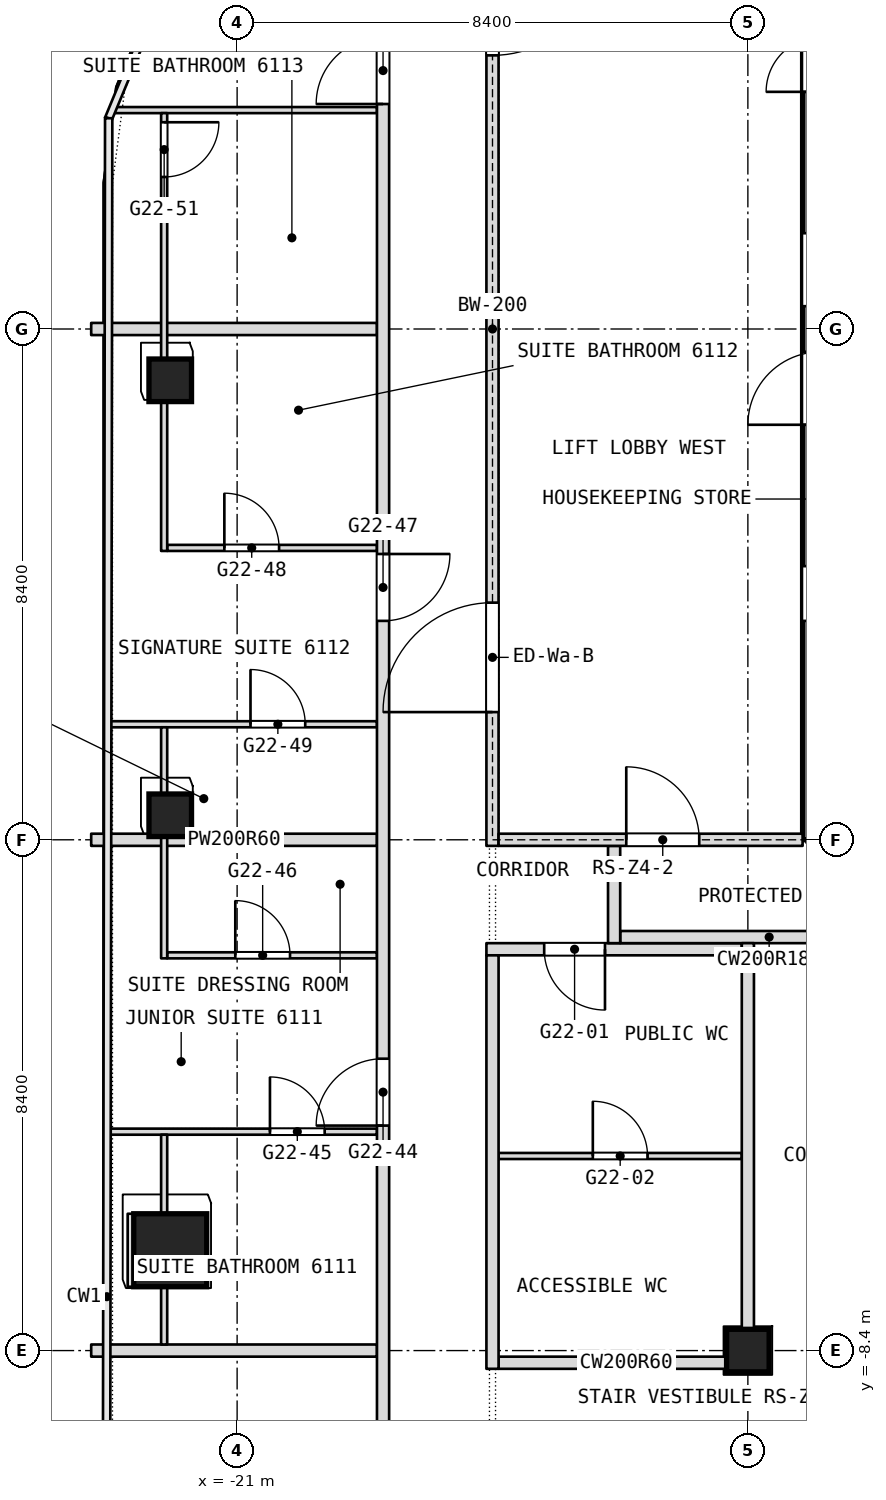
"""IFC4 building model, lengths in metres.
Left out: names, types, materials, properties, quantities, classifications, styles, units other than length and angle.
Written with IfcOpenShell. Run it as: python <this file> out.ifc"""

import sys

from ifc_helpers import new_model, si_unit, direction, frame, frame_2d, origin, origin_2d, place, context, subcontext, project, spatial, rectangle, extrude, element, fill, save


model = new_model("IFC4")
c1 = context("Model", 3, precision=1e-05, world=origin(), true_north=direction((0.0, 1.0)))
c2 = subcontext(c1, "Body", "Model", "MODEL_VIEW")
j1 = project(units=[si_unit("LENGTHUNIT", "METRE"), si_unit("PLANEANGLEUNIT", "RADIAN")], contexts=[c1])
p1 = place(None, origin())
s1 = spatial("IfcSite", under=j1, at=p1, CompositionType="ELEMENT")
p2 = place(p1, origin())
s2 = spatial("IfcBuilding", under=s1, at=p2, CompositionType="ELEMENT")
p3 = place(p2, frame((0.0, 0.0, 266.9)))
s3 = spatial("IfcBuildingStorey", under=s2, at=p3, CompositionType="ELEMENT", Elevation=266.9)
p4 = place(p3, frame((-11.4, 0.0, 0.0), z_axis=(0.0, 0.0, 1.0), x_axis=(0.0, 1.0, 0.0)))
e1 = element("IfcWall", 1, at=p4, inside=s3, PredefinedType="SHEAR", context=c2, shape_type="SweptSolid", body=[
    extrude(rectangle(XDim=16.8, YDim=0.6, at=frame_2d((8.4, 0.0))), origin(), (0.0, 0.0, 1.0), 3.6),
])
p5 = place(p4, frame((3.6, 0.0, 0.0)))
e2 = element("IfcOpeningElement", 2, at=p5, cuts=e1, PredefinedType="OPENING", context=c2, shape_type="SweptSolid", body=[
    extrude(rectangle(XDim=0.9, YDim=2.1, at=frame_2d((0.45, 1.05))), frame((0.0, 0.3, 0.0), z_axis=(0.0, -1.0, 0.0), x_axis=(1.0, 0.0, 0.0)), (0.0, 0.0, 1.0), 0.6),
])
p6 = place(p4, frame((6.825, 0.0, 0.0)))
e3 = element("IfcOpeningElement", 3, at=p6, cuts=e1, PredefinedType="OPENING", context=c2, shape_type="SweptSolid", body=[
    extrude(rectangle(XDim=1.2, YDim=2.1, at=frame_2d((0.6, 1.05))), frame((0.0, 0.3, 0.0), z_axis=(0.0, -1.0, 0.0), x_axis=(1.0, 0.0, 0.0)), (0.0, 0.0, 1.0), 0.6),
])
p7 = place(p4, frame((12.3, 0.0, 0.0)))
e4 = element("IfcOpeningElement", 4, at=p7, cuts=e1, PredefinedType="OPENING", context=c2, shape_type="SweptSolid", body=[
    extrude(rectangle(XDim=0.9, YDim=2.1, at=frame_2d((0.45, 1.05))), frame((0.0, 0.3, 0.0), z_axis=(0.0, -1.0, 0.0), x_axis=(1.0, 0.0, 0.0)), (0.0, 0.0, 1.0), 0.6),
])
p8 = place(p4, frame((8.775, 0.0, 0.0)))
e5 = element("IfcOpeningElement", 5, at=p8, cuts=e1, PredefinedType="OPENING", context=c2, shape_type="SweptSolid", body=[
    extrude(rectangle(XDim=1.2, YDim=2.1, at=frame_2d((0.6, 1.05))), frame((0.0, 0.3, 0.0), z_axis=(0.0, -1.0, 0.0), x_axis=(1.0, 0.0, 0.0)), (0.0, 0.0, 1.0), 0.6),
])
p9 = place(p3, frame((-22.1, -6.75, 0.0), z_axis=(0.0, 0.0, 1.0), x_axis=(1.0, 0.0, 0.0)))
e6 = element("IfcColumn", 6, at=p9, inside=s3, PredefinedType="COLUMN", context=c2, shape_type="SweptSolid", body=[
    extrude(rectangle(XDim=1.2, YDim=1.2, at=origin_2d()), origin(), (0.0, 0.0, 1.0), 3.6),
])
for number, where, z_axis, x_axis in (
    (7, (-12.6, -8.4, 0.0), (0.0, 0.0, 1.0), (1.0, 0.0, 0.0)),
    (8, (-22.1, 0.403, 0.0), (0.0, 0.0, 1.0), (1.0, 0.0, 0.0)),
    (9, (-22.1, 7.556, 0.0), (0.0, 0.0, 1.0), (1.0, 0.0, 0.0)),
):
    element("IfcColumn", number, at=place(p3, frame(where, z_axis=z_axis, x_axis=x_axis)), inside=s3, PredefinedType="COLUMN", context=c2, shape_type="SweptSolid", body=[
        extrude(rectangle(XDim=0.7, YDim=0.7, at=origin_2d()), origin(), (0.0, 0.0, 1.0), 3.6),
    ])
p10 = place(p3, frame((-16.7, -8.6, 0.0), z_axis=(0.0, 0.0, 1.0), x_axis=(1.0, 0.0, 0.0)))
e10 = element("IfcWall", 10, at=p10, inside=s3, PredefinedType="PARTITIONING", context=c2, shape_type="SweptSolid", body=[
    extrude(rectangle(XDim=4.2, YDim=0.2, at=frame_2d((2.1, 0.0))), origin(), (0.0, 0.0, 1.0), 3.34),
])
p11 = place(p3, frame((-23.4, -8.4, 0.0), z_axis=(0.0, 0.0, 1.0), x_axis=(1.0, 0.0, 0.0)))
e11 = element("IfcWall", 11, at=p11, inside=s3, PredefinedType="PARTITIONING", context=c2, shape_type="SweptSolid", body=[
    extrude(rectangle(XDim=4.7, YDim=0.2, at=frame_2d((2.35, 0.0))), origin(), (0.0, 0.0, 1.0), 3.0),
])
p12 = place(p3, frame((-16.7, -5.2, 0.0), z_axis=(0.0, 0.0, 1.0), x_axis=(1.0, 0.0, 0.0)))
e12 = element("IfcWall", 12, at=p12, inside=s3, PredefinedType="PARTITIONING", context=c2, shape_type="SweptSolid", body=[
    extrude(rectangle(XDim=4.0, YDim=0.1, at=frame_2d((2.0, 0.0))), origin(), (0.0, 0.0, 1.0), 3.34),
])
p13 = place(p12, frame((1.55, 0.0, 0.0)))
e13 = element("IfcOpeningElement", 13, at=p13, cuts=e12, PredefinedType="OPENING", context=c2, shape_type="SweptSolid", body=[
    extrude(rectangle(XDim=0.9, YDim=2.1, at=frame_2d((0.45, 1.05))), frame((0.0, 0.05, 0.0), z_axis=(0.0, -1.0, 0.0), x_axis=(1.0, 0.0, 0.0)), (0.0, 0.0, 1.0), 0.1),
])
p14 = place(p3, frame((-23.108, -4.8, 0.0), z_axis=(0.0, 0.0, 1.0), x_axis=(1.0, 0.0, 0.0)))
e14 = element("IfcWall", 14, at=p14, inside=s3, PredefinedType="PARTITIONING", context=c2, shape_type="SweptSolid", body=[
    extrude(rectangle(XDim=4.408, YDim=0.1, at=frame_2d((2.204, 0.0))), origin(), (0.0, 0.0, 1.0), 3.34),
])
p15 = place(p14, frame((2.648, 0.0, 0.0)))
e15 = element("IfcOpeningElement", 15, at=p15, cuts=e14, PredefinedType="OPENING", context=c2, shape_type="SweptSolid", body=[
    extrude(rectangle(XDim=0.9, YDim=2.1, at=frame_2d((0.45, 1.05))), frame((0.0, 0.05, 0.0), z_axis=(0.0, -1.0, 0.0), x_axis=(1.0, 0.0, 0.0)), (0.0, 0.0, 1.0), 0.1),
])
p16 = place(p3, frame((-22.15, -1.9, 0.0), z_axis=(0.0, 0.0, 1.0), x_axis=(1.0, 0.0, 0.0)))
e16 = element("IfcWall", 16, at=p16, inside=s3, PredefinedType="PARTITIONING", context=c2, shape_type="SweptSolid", body=[
    extrude(rectangle(XDim=3.45, YDim=0.1, at=frame_2d((1.725, 0.0))), origin(), (0.0, 0.0, 1.0), 3.34),
])
p17 = place(p16, frame((1.12, 0.0, 0.0)))
e17 = element("IfcOpeningElement", 17, at=p17, cuts=e16, PredefinedType="OPENING", context=c2, shape_type="SweptSolid", body=[
    extrude(rectangle(XDim=0.9, YDim=2.1, at=frame_2d((0.45, 1.05))), frame((0.0, 0.05, 0.0), z_axis=(0.0, -1.0, 0.0), x_axis=(1.0, 0.0, 0.0)), (0.0, 0.0, 1.0), 0.1),
])
p18 = place(p3, frame((-16.9, -1.8, 0.0), z_axis=(0.0, 0.0, 1.0), x_axis=(1.0, 0.0, 0.0)))
e18 = element("IfcWall", 18, at=p18, inside=s3, PredefinedType="PARTITIONING", context=c2, shape_type="SweptSolid", body=[
    extrude(rectangle(XDim=4.2, YDim=0.2, at=frame_2d((2.1, 0.0))), origin(), (0.0, 0.0, 1.0), 3.34),
])
p19 = place(p18, frame((0.95, 0.0, 0.0)))
e19 = element("IfcOpeningElement", 19, at=p19, cuts=e18, PredefinedType="OPENING", context=c2, shape_type="SweptSolid", body=[
    extrude(rectangle(XDim=1.0, YDim=2.1, at=frame_2d((0.5, 1.05))), frame((0.0, 0.1, 0.0), z_axis=(0.0, -1.0, 0.0), x_axis=(1.0, 0.0, 0.0)), (0.0, 0.0, 1.0), 0.2),
])
p20 = place(p3, frame((-14.7, -1.6, 0.0), z_axis=(0.0, 0.0, 1.0), x_axis=(1.0, 0.0, 0.0)))
e20 = element("IfcWall", 20, at=p20, inside=s3, PredefinedType="PARTITIONING", context=c2, shape_type="SweptSolid", body=[
    extrude(rectangle(XDim=4.9, YDim=0.2, at=frame_2d((2.45, 0.0))), origin(), (0.0, 0.0, 1.0), 3.34),
])
p21 = place(p3, frame((-23.4, 0.0, 0.0), z_axis=(0.0, 0.0, 1.0), x_axis=(1.0, 0.0, 0.0)))
e21 = element("IfcWall", 21, at=p21, inside=s3, PredefinedType="PARTITIONING", context=c2, shape_type="SweptSolid", body=[
    extrude(rectangle(XDim=4.7, YDim=0.2, at=frame_2d((2.35, 0.0))), origin(), (0.0, 0.0, 1.0), 3.0),
])
p22 = place(p3, frame((-23.098, 1.9, 0.0), z_axis=(0.0, 0.0, 1.0), x_axis=(1.0, 0.0, 0.0)))
e22 = element("IfcWall", 22, at=p22, inside=s3, PredefinedType="PARTITIONING", context=c2, shape_type="SweptSolid", body=[
    extrude(rectangle(XDim=4.398, YDim=0.1, at=frame_2d((2.199, 0.0))), origin(), (0.0, 0.0, 1.0), 3.34),
])
p23 = place(p22, frame((2.318, 0.0, 0.0)))
e23 = element("IfcOpeningElement", 23, at=p23, cuts=e22, PredefinedType="OPENING", context=c2, shape_type="SweptSolid", body=[
    extrude(rectangle(XDim=0.9, YDim=2.1, at=frame_2d((0.45, 1.05))), frame((0.0, 0.05, 0.0), z_axis=(0.0, -1.0, 0.0), x_axis=(1.0, 0.0, 0.0)), (0.0, 0.0, 1.0), 0.1),
])
p24 = place(p3, frame((-22.15, 4.8, 0.0), z_axis=(0.0, 0.0, 1.0), x_axis=(1.0, 0.0, 0.0)))
e24 = element("IfcWall", 24, at=p24, inside=s3, PredefinedType="PARTITIONING", context=c2, shape_type="SweptSolid", body=[
    extrude(rectangle(XDim=3.45, YDim=0.1, at=frame_2d((1.725, 0.0))), origin(), (0.0, 0.0, 1.0), 3.34),
])
p25 = place(p24, frame((0.94, 0.0, 0.0)))
e25 = element("IfcOpeningElement", 25, at=p25, cuts=e24, PredefinedType="OPENING", context=c2, shape_type="SweptSolid", body=[
    extrude(rectangle(XDim=0.9, YDim=2.1, at=frame_2d((0.45, 1.05))), frame((0.0, 0.05, 0.0), z_axis=(0.0, -1.0, 0.0), x_axis=(1.0, 0.0, 0.0)), (0.0, 0.0, 1.0), 0.1),
])
p26 = place(p3, frame((-23.4, 8.4, 0.0), z_axis=(0.0, 0.0, 1.0), x_axis=(1.0, 0.0, 0.0)))
e26 = element("IfcWall", 26, at=p26, inside=s3, PredefinedType="PARTITIONING", context=c2, shape_type="SweptSolid", body=[
    extrude(rectangle(XDim=4.7, YDim=0.2, at=frame_2d((2.35, 0.0))), origin(), (0.0, 0.0, 1.0), 3.0),
])
p27 = place(p3, frame((-23.027, 12.0, 0.0), z_axis=(0.0, 0.0, 1.0), x_axis=(1.0, 0.0, 0.0)))
e27 = element("IfcWall", 27, at=p27, inside=s3, PredefinedType="PARTITIONING", context=c2, shape_type="SweptSolid", body=[
    extrude(rectangle(XDim=4.327, YDim=0.1, at=frame_2d((2.164, 0.0))), origin(), (0.0, 0.0, 1.0), 3.34),
])
p28 = place(p3, frame((-12.6, -8.5, 0.0), z_axis=(0.0, 0.0, 1.0), x_axis=(0.0, 1.0, 0.0)))
e28 = element("IfcWall", 28, at=p28, inside=s3, PredefinedType="PARTITIONING", context=c2, shape_type="SweptSolid", body=[
    extrude(rectangle(XDim=6.8, YDim=0.2, at=frame_2d((3.4, 0.0))), origin(), (0.0, 0.0, 1.0), 3.34),
])
p29 = place(p3, frame((-14.8, -1.7, 0.0), z_axis=(0.0, 0.0, 1.0), x_axis=(0.0, 1.0, 0.0)))
e29 = element("IfcWall", 29, at=p29, inside=s3, PredefinedType="PARTITIONING", context=c2, shape_type="SweptSolid", body=[
    extrude(rectangle(XDim=1.6, YDim=0.2, at=frame_2d((0.8, 0.0))), origin(), (0.0, 0.0, 1.0), 3.34),
])
p30 = place(p3, frame((-16.8, -8.7, 0.0), z_axis=(0.0, 0.0, 1.0), x_axis=(0.0, 1.0, 0.0)))
e30 = element("IfcWall", 30, at=p30, inside=s3, PredefinedType="PARTITIONING", context=c2, shape_type="SweptSolid", body=[
    extrude(rectangle(XDim=6.8, YDim=0.2, at=frame_2d((3.4, 0.0))), origin(), (0.0, 0.0, 1.0), 3.34),
])
p31 = place(p3, frame((-18.6, -31.794, 0.0), z_axis=(0.0, 0.0, 1.0), x_axis=(0.0, 1.0, 0.0)))
e31 = element("IfcWall", 31, at=p31, inside=s3, PredefinedType="PARTITIONING", context=c2, shape_type="SweptSolid", body=[
    extrude(rectangle(XDim=48.697, YDim=0.2, at=frame_2d((24.349, 0.0))), origin(), (0.0, 0.0, 1.0), 3.34),
])
p32 = place(p31, frame((5.274, 0.0, 0.0)))
e32 = element("IfcOpeningElement", 32, at=p32, cuts=e31, PredefinedType="OPENING", context=c2, shape_type="SweptSolid", body=[
    extrude(rectangle(XDim=1.0, YDim=2.1, at=frame_2d((0.5, 1.05))), frame((0.0, 0.1, 0.0), z_axis=(0.0, -1.0, 0.0), x_axis=(1.0, 0.0, 0.0)), (0.0, 0.0, 1.0), 0.2),
])
p33 = place(p31, frame((9.021, 0.0, 0.0)))
e33 = element("IfcOpeningElement", 33, at=p33, cuts=e31, PredefinedType="OPENING", context=c2, shape_type="SweptSolid", body=[
    extrude(rectangle(XDim=1.0, YDim=2.1, at=frame_2d((0.5, 1.05))), frame((0.0, 0.1, 0.0), z_axis=(0.0, -1.0, 0.0), x_axis=(1.0, 0.0, 0.0)), (0.0, 0.0, 1.0), 0.2),
])
p34 = place(p31, frame((18.294, 0.0, 0.0)))
e34 = element("IfcOpeningElement", 34, at=p34, cuts=e31, PredefinedType="OPENING", context=c2, shape_type="SweptSolid", body=[
    extrude(rectangle(XDim=1.8, YDim=2.1, at=frame_2d((0.9, 1.05))), frame((0.0, 0.1, 0.0), z_axis=(0.0, -1.0, 0.0), x_axis=(1.0, 0.0, 0.0)), (0.0, 0.0, 1.0), 0.2),
])
p35 = place(p31, frame((27.094, 0.0, 0.0)))
e35 = element("IfcOpeningElement", 35, at=p35, cuts=e31, PredefinedType="OPENING", context=c2, shape_type="SweptSolid", body=[
    extrude(rectangle(XDim=1.1, YDim=2.1, at=frame_2d((0.55, 1.05))), frame((0.0, 0.1, 0.0), z_axis=(0.0, -1.0, 0.0), x_axis=(1.0, 0.0, 0.0)), (0.0, 0.0, 1.0), 0.2),
])
p36 = place(p31, frame((35.394, 0.0, 0.0)))
e36 = element("IfcOpeningElement", 36, at=p36, cuts=e31, PredefinedType="OPENING", context=c2, shape_type="SweptSolid", body=[
    extrude(rectangle(XDim=1.1, YDim=2.1, at=frame_2d((0.55, 1.05))), frame((0.0, 0.1, 0.0), z_axis=(0.0, -1.0, 0.0), x_axis=(1.0, 0.0, 0.0)), (0.0, 0.0, 1.0), 0.2),
])
p37 = place(p31, frame((43.894, 0.0, 0.0)))
e37 = element("IfcOpeningElement", 37, at=p37, cuts=e31, PredefinedType="OPENING", context=c2, shape_type="SweptSolid", body=[
    extrude(rectangle(XDim=1.1, YDim=2.1, at=frame_2d((0.55, 1.05))), frame((0.0, 0.1, 0.0), z_axis=(0.0, -1.0, 0.0), x_axis=(1.0, 0.0, 0.0)), (0.0, 0.0, 1.0), 0.2),
])
p38 = place(p3, frame((-22.2, -8.3, 0.0), z_axis=(0.0, 0.0, 1.0), x_axis=(0.0, 1.0, 0.0)))
e38 = element("IfcWall", 38, at=p38, inside=s3, PredefinedType="PARTITIONING", context=c2, shape_type="SweptSolid", body=[
    extrude(rectangle(XDim=0.95, YDim=0.1, at=frame_2d((0.475, 0.0))), origin(), (0.0, 0.0, 1.0), 3.34),
])
p39 = place(p3, frame((-22.2, -6.15, 0.0), z_axis=(0.0, 0.0, 1.0), x_axis=(0.0, 1.0, 0.0)))
e39 = element("IfcWall", 39, at=p39, inside=s3, PredefinedType="PARTITIONING", context=c2, shape_type="SweptSolid", body=[
    extrude(rectangle(XDim=1.3, YDim=0.1, at=frame_2d((0.65, 0.0))), origin(), (0.0, 0.0, 1.0), 3.34),
])
p40 = place(p3, frame((-22.2, -1.95, 0.0), z_axis=(0.0, 0.0, 1.0), x_axis=(0.0, 1.0, 0.0)))
e40 = element("IfcWall", 40, at=p40, inside=s3, PredefinedType="PARTITIONING", context=c2, shape_type="SweptSolid", body=[
    extrude(rectangle(XDim=3.8, YDim=0.1, at=frame_2d((1.9, 0.0))), origin(), (0.0, 0.0, 1.0), 3.0),
])
p41 = place(p3, frame((-22.2, 4.75, 0.0), z_axis=(0.0, 0.0, 1.0), x_axis=(0.0, 1.0, 0.0)))
e41 = element("IfcWall", 41, at=p41, inside=s3, PredefinedType="PARTITIONING", context=c2, shape_type="SweptSolid", body=[
    extrude(rectangle(XDim=7.2, YDim=0.1, at=frame_2d((3.6, 0.0))), origin(), (0.0, 0.0, 1.0), 3.0),
])
p42 = place(p41, frame((6.15, 0.0, 0.0)))
e42 = element("IfcOpeningElement", 42, at=p42, cuts=e41, PredefinedType="OPENING", context=c2, shape_type="SweptSolid", body=[
    extrude(rectangle(XDim=0.9, YDim=2.1, at=frame_2d((0.45, 1.05))), frame((0.0, 0.05, 0.0), z_axis=(0.0, -1.0, 0.0), x_axis=(1.0, 0.0, 0.0)), (0.0, 0.0, 1.0), 0.1),
])
p43 = place(p3, frame((-22.75, -7.35, 0.0), z_axis=(0.0, 0.0, 1.0), x_axis=(0.0, 1.0, 0.0)))
e43 = element("IfcWall", 43, at=p43, inside=s3, PredefinedType="PARTITIONING", context=c2, shape_type="SweptSolid", body=[
    extrude(rectangle(XDim=1.2, YDim=0.1, at=frame_2d((0.6, 0.0))), origin(), (0.0, 0.0, 1.0), 3.34),
])
p44 = place(p3, frame((-16.8, -0.1, 0.0), z_axis=(0.0, 0.0, 1.0), x_axis=(0.0, 1.0, 0.0)))
e44 = element("IfcWall", 44, at=p44, inside=s3, PredefinedType="PARTITIONING", context=c2, shape_type="SweptSolid", body=[
    extrude(rectangle(XDim=17.0, YDim=0.2, at=frame_2d((8.5, 0.0))), origin(), (0.0, 0.0, 1.0), 3.34),
])
p45 = place(p44, frame((2.2, 0.0, 0.0)))
e45 = element("IfcOpeningElement", 45, at=p45, cuts=e44, PredefinedType="OPENING", context=c2, shape_type="SweptSolid", body=[
    extrude(rectangle(XDim=1.8, YDim=2.1, at=frame_2d((0.9, 1.05))), frame((0.0, 0.1, 0.0), z_axis=(0.0, -1.0, 0.0), x_axis=(1.0, 0.0, 0.0)), (0.0, 0.0, 1.0), 0.2),
])
p46 = place(p44, frame((13.0, 0.0, 0.0)))
e46 = element("IfcOpeningElement", 46, at=p46, cuts=e44, PredefinedType="OPENING", context=c2, shape_type="SweptSolid", body=[
    extrude(rectangle(XDim=1.8, YDim=2.1, at=frame_2d((0.9, 1.05))), frame((0.0, 0.1, 0.0), z_axis=(0.0, -1.0, 0.0), x_axis=(1.0, 0.0, 0.0)), (0.0, 0.0, 1.0), 0.2),
])
p47 = place(p3, frame((-16.7, 0.0, 0.0), z_axis=(0.0, 0.0, 1.0), x_axis=(1.0, 0.0, 0.0)))
e47 = element("IfcWall", 47, at=p47, inside=s3, PredefinedType="PARTITIONING", context=c2, shape_type="SweptSolid", body=[
    extrude(rectangle(XDim=5.0, YDim=0.2, at=frame_2d((2.5, 0.0))), origin(), (0.0, 0.0, 1.0), 3.0),
])
p48 = place(p47, frame((2.1, 0.0, 0.0)))
e48 = element("IfcOpeningElement", 48, at=p48, cuts=e47, PredefinedType="OPENING", context=c2, shape_type="SweptSolid", body=[
    extrude(rectangle(XDim=1.2, YDim=2.1, at=frame_2d((0.6, 1.05))), frame((0.0, 0.1, 0.0), z_axis=(0.0, -1.0, 0.0), x_axis=(1.0, 0.0, 0.0)), (0.0, 0.0, 1.0), 0.2),
])
p49 = place(p13, origin())
e49 = element("IfcDoor", 49, at=p49, inside=s3, OperationType="SINGLE_SWING_RIGHT", PredefinedType="DOOR", context=c2, shape_type="SweptSolid", body=[
    extrude(rectangle(XDim=0.9, YDim=2.1, at=frame_2d((0.45, 1.05))), frame((0.0, 0.025, 0.0), z_axis=(0.0, -1.0, 0.0), x_axis=(1.0, 0.0, 0.0)), (0.0, 0.0, 1.0), 0.05),
])
fill(e13, e49)
p50 = place(p15, origin())
e50 = element("IfcDoor", 50, at=p50, inside=s3, OperationType="SINGLE_SWING_RIGHT", PredefinedType="DOOR", context=c2, shape_type="SweptSolid", body=[
    extrude(rectangle(XDim=0.9, YDim=2.1, at=frame_2d((0.45, 1.05))), frame((0.0, 0.025, 0.0), z_axis=(0.0, -1.0, 0.0), x_axis=(1.0, 0.0, 0.0)), (0.0, 0.0, 1.0), 0.05),
])
fill(e15, e50)
p51 = place(p17, origin())
e51 = element("IfcDoor", 51, at=p51, inside=s3, OperationType="SINGLE_SWING_LEFT", PredefinedType="DOOR", context=c2, shape_type="SweptSolid", body=[
    extrude(rectangle(XDim=0.9, YDim=2.1, at=frame_2d((0.45, 1.05))), frame((0.0, 0.025, 0.0), z_axis=(0.0, -1.0, 0.0), x_axis=(1.0, 0.0, 0.0)), (0.0, 0.0, 1.0), 0.05),
])
fill(e17, e51)
p52 = place(p19, origin())
e52 = element("IfcDoor", 52, at=p52, inside=s3, OperationType="SINGLE_SWING_LEFT", PredefinedType="DOOR", context=c2, shape_type="SweptSolid", body=[
    extrude(rectangle(XDim=1.0, YDim=2.1, at=frame_2d((0.5, 1.05))), frame((0.0, 0.025, 0.0), z_axis=(0.0, -1.0, 0.0), x_axis=(1.0, 0.0, 0.0)), (0.0, 0.0, 1.0), 0.05),
])
fill(e19, e52)
p53 = place(p23, origin())
e53 = element("IfcDoor", 53, at=p53, inside=s3, OperationType="SINGLE_SWING_RIGHT", PredefinedType="DOOR", context=c2, shape_type="SweptSolid", body=[
    extrude(rectangle(XDim=0.9, YDim=2.1, at=frame_2d((0.45, 1.05))), frame((0.0, 0.025, 0.0), z_axis=(0.0, -1.0, 0.0), x_axis=(1.0, 0.0, 0.0)), (0.0, 0.0, 1.0), 0.05),
])
fill(e23, e53)
p54 = place(p25, origin())
e54 = element("IfcDoor", 54, at=p54, inside=s3, OperationType="SINGLE_SWING_LEFT", PredefinedType="DOOR", context=c2, shape_type="SweptSolid", body=[
    extrude(rectangle(XDim=0.9, YDim=2.1, at=frame_2d((0.45, 1.05))), frame((0.0, 0.025, 0.0), z_axis=(0.0, -1.0, 0.0), x_axis=(1.0, 0.0, 0.0)), (0.0, 0.0, 1.0), 0.05),
])
fill(e25, e54)
p55 = place(p35, origin())
e55 = element("IfcDoor", 55, at=p55, inside=s3, OperationType="SINGLE_SWING_LEFT", PredefinedType="DOOR", context=c2, shape_type="SweptSolid", body=[
    extrude(rectangle(XDim=1.1, YDim=2.1, at=frame_2d((0.55, 1.05))), frame((0.0, 0.025, 0.0), z_axis=(0.0, -1.0, 0.0), x_axis=(1.0, 0.0, 0.0)), (0.0, 0.0, 1.0), 0.05),
])
fill(e35, e55)
p56 = place(p36, origin())
e56 = element("IfcDoor", 56, at=p56, inside=s3, OperationType="SINGLE_SWING_RIGHT", PredefinedType="DOOR", context=c2, shape_type="SweptSolid", body=[
    extrude(rectangle(XDim=1.1, YDim=2.1, at=frame_2d((0.55, 1.05))), frame((0.0, 0.025, 0.0), z_axis=(0.0, -1.0, 0.0), x_axis=(1.0, 0.0, 0.0)), (0.0, 0.0, 1.0), 0.05),
])
fill(e36, e56)
p57 = place(p37, origin())
e57 = element("IfcDoor", 57, at=p57, inside=s3, OperationType="SINGLE_SWING_LEFT", PredefinedType="DOOR", context=c2, shape_type="SweptSolid", body=[
    extrude(rectangle(XDim=1.1, YDim=2.1, at=frame_2d((0.55, 1.05))), frame((0.0, 0.025, 0.0), z_axis=(0.0, -1.0, 0.0), x_axis=(1.0, 0.0, 0.0)), (0.0, 0.0, 1.0), 0.05),
])
fill(e37, e57)
p58 = place(p42, origin())
e58 = element("IfcDoor", 58, at=p58, inside=s3, OperationType="SINGLE_SWING_LEFT", PredefinedType="DOOR", context=c2, shape_type="SweptSolid", body=[
    extrude(rectangle(XDim=0.9, YDim=2.1, at=frame_2d((0.45, 1.05))), frame((0.0, 0.025, 0.0), z_axis=(0.0, -1.0, 0.0), x_axis=(1.0, 0.0, 0.0)), (0.0, 0.0, 1.0), 0.05),
])
fill(e42, e58)
p59 = place(p45, origin())
e59 = element("IfcDoor", 59, at=p59, inside=s3, OperationType="DOUBLE_DOOR_SINGLE_SWING", PredefinedType="DOOR", context=c2, shape_type="SweptSolid", body=[
    extrude(rectangle(XDim=1.8, YDim=2.1, at=frame_2d((0.9, 1.05))), frame((0.0, 0.025, 0.0), z_axis=(0.0, -1.0, 0.0), x_axis=(1.0, 0.0, 0.0)), (0.0, 0.0, 1.0), 0.05),
])
fill(e45, e59)
p60 = place(p46, origin())
e60 = element("IfcDoor", 60, at=p60, inside=s3, OperationType="DOUBLE_DOOR_SINGLE_SWING", PredefinedType="DOOR", context=c2, shape_type="SweptSolid", body=[
    extrude(rectangle(XDim=1.8, YDim=2.1, at=frame_2d((0.9, 1.05))), frame((0.0, 0.025, 0.0), z_axis=(0.0, -1.0, 0.0), x_axis=(1.0, 0.0, 0.0)), (0.0, 0.0, 1.0), 0.05),
])
fill(e46, e60)
p61 = place(p48, origin())
e61 = element("IfcDoor", 61, at=p61, inside=s3, OperationType="SINGLE_SWING_LEFT", PredefinedType="DOOR", context=c2, shape_type="SweptSolid", body=[
    extrude(rectangle(XDim=1.2, YDim=2.1, at=frame_2d((0.6, 1.05))), frame((0.0, 0.025, 0.0), z_axis=(0.0, -1.0, 0.0), x_axis=(1.0, 0.0, 0.0)), (0.0, 0.0, 1.0), 0.05),
])
fill(e48, e61)
save(model, sys.argv[1])
